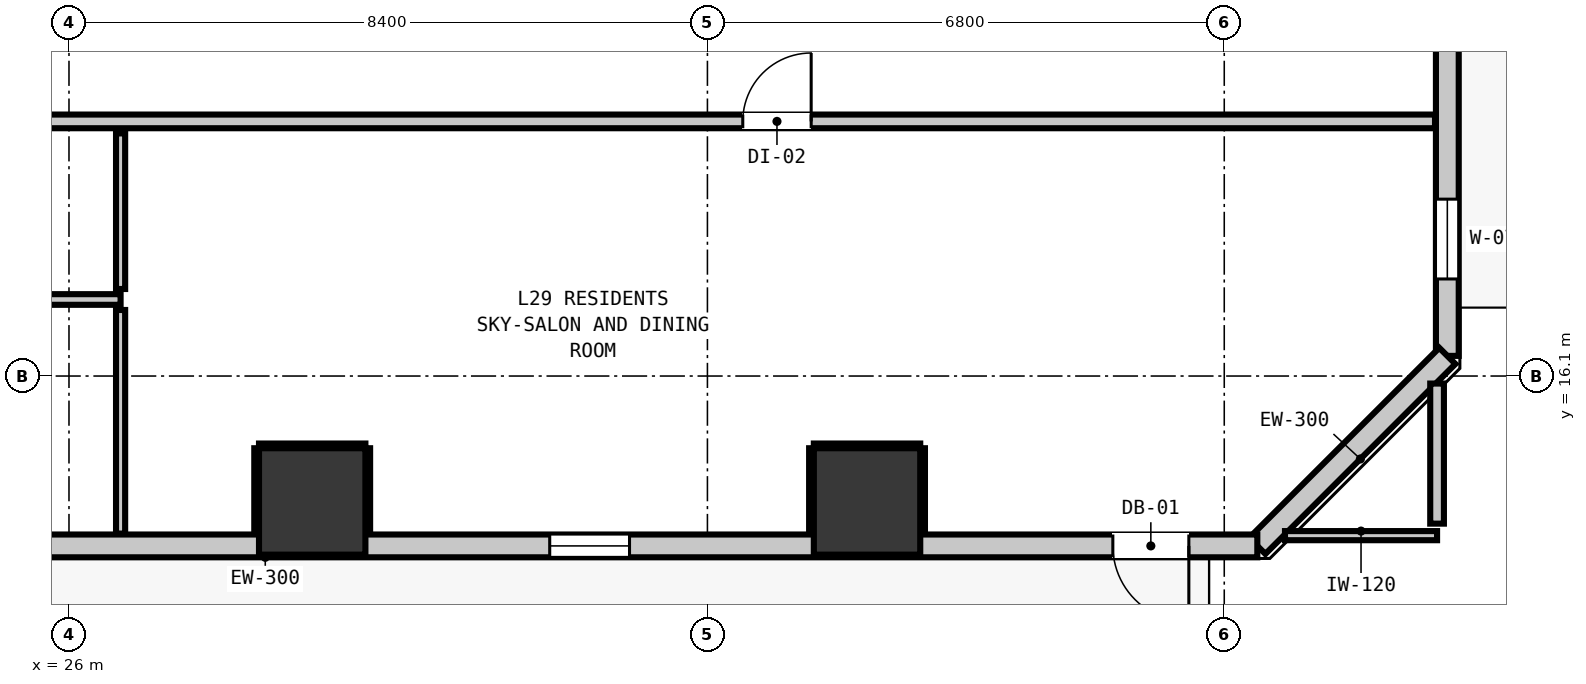
"""IFC4 building model, lengths in metres.
Left out: names, types, materials, properties, quantities, classifications, styles, units other than length and angle.
Written with IfcOpenShell. Run it as: python <this file> out.ifc"""

import sys

from ifc_helpers import new_model, si_unit, direction, frame, frame_2d, origin, origin_2d, place, context, subcontext, project, spatial, rectangle, extrude, element, fill, save


model = new_model("IFC4")
c1 = context("Model", 3, precision=1e-05, world=origin(), true_north=direction((0.0, 1.0)))
c2 = subcontext(c1, "Body", "Model", "MODEL_VIEW")
j1 = project(units=[si_unit("LENGTHUNIT", "METRE"), si_unit("PLANEANGLEUNIT", "RADIAN")], contexts=[c1])
p1 = place(None, origin())
s1 = spatial("IfcSite", under=j1, at=p1, CompositionType="ELEMENT")
p2 = place(p1, origin())
s2 = spatial("IfcBuilding", under=s1, at=p2, CompositionType="ELEMENT")
p3 = place(p2, frame((0.0, 0.0, 102.76)))
s3 = spatial("IfcBuildingStorey", under=s2, at=p3, CompositionType="ELEMENT", Elevation=102.76)
for number, where, z_axis, x_axis in (
    (1, (29.2, 14.45, 0.0), (0.0, 0.0, 1.0), (1.0, 0.0, 0.0)),
    (2, (36.5, 14.45, 0.0), (0.0, 0.0, 1.0), (1.0, 0.0, 0.0)),
):
    element("IfcColumn", number, at=place(p3, frame(where, z_axis=z_axis, x_axis=x_axis)), inside=s3, PredefinedType="COLUMN", context=c2, shape_type="SweptSolid", body=[
        extrude(rectangle(XDim=1.4, YDim=1.4, at=origin_2d()), origin(), (0.0, 0.0, 1.0), 2.9),
    ])
p4 = place(p3, frame((44.135, 51.035, 0.0), z_axis=(0.0, 0.0, 1.0), x_axis=(0.0, -1.0, 0.0)))
e3 = element("IfcWall", 3, at=p4, inside=s3, PredefinedType="STANDARD", context=c2, shape_type="SweptSolid", body=[
    extrude(rectangle(XDim=34.67, YDim=0.3, at=frame_2d((17.335, 0.0))), origin(), (0.0, 0.0, 1.0), 2.9),
])
p5 = place(p4, frame((0.901, 0.0, 0.0)))
e4 = element("IfcOpeningElement", 4, at=p5, cuts=e3, PredefinedType="OPENING", context=c2, shape_type="SweptSolid", body=[
    extrude(rectangle(XDim=1.0, YDim=2.15, at=frame_2d((0.5, 1.075))), frame((0.0, 0.16, 0.0), z_axis=(0.0, -1.0, 0.0), x_axis=(1.0, 0.0, 0.0)), (0.0, 0.0, 1.0), 0.32),
])
p6 = place(p4, frame((32.608, 0.0, 0.85)))
e5 = element("IfcOpeningElement", 5, at=p6, cuts=e3, PredefinedType="OPENING", context=c2, shape_type="SweptSolid", body=[
    extrude(rectangle(XDim=1.05, YDim=1.65, at=frame_2d((0.525, 0.825))), frame((0.0, 0.16, 0.0), z_axis=(0.0, -1.0, 0.0), x_axis=(1.0, 0.0, 0.0)), (0.0, 0.0, 1.0), 0.32),
])
p7 = place(p4, frame((23.248, 0.0, 0.85)))
e6 = element("IfcOpeningElement", 6, at=p7, cuts=e3, PredefinedType="OPENING", context=c2, shape_type="SweptSolid", body=[
    extrude(rectangle(XDim=1.05, YDim=1.65, at=frame_2d((0.525, 0.825))), frame((0.0, 0.16, 0.0), z_axis=(0.0, -1.0, 0.0), x_axis=(1.0, 0.0, 0.0)), (0.0, 0.0, 1.0), 0.32),
])
p8 = place(p3, frame((44.135, 16.365, 0.0), z_axis=(0.0, 0.0, 1.0), x_axis=(-0.707106781187, -0.707106781187, 0.0)))
e7 = element("IfcWall", 7, at=p8, inside=s3, PredefinedType="STANDARD", context=c2, shape_type="SweptSolid", body=[
    extrude(rectangle(XDim=3.536, YDim=0.3, at=frame_2d((1.768, 0.0))), origin(), (0.0, 0.0, 1.0), 2.9),
])
p9 = place(p3, frame((41.635, 13.865, 0.0), z_axis=(0.0, 0.0, 1.0), x_axis=(-1.0, 0.0, 0.0)))
e8 = element("IfcWall", 8, at=p9, inside=s3, PredefinedType="STANDARD", context=c2, shape_type="SweptSolid", body=[
    extrude(rectangle(XDim=37.47, YDim=0.3, at=frame_2d((18.735, 0.0))), origin(), (0.0, 0.0, 1.0), 2.9),
])
p10 = place(p9, frame((0.901, 0.0, 0.0)))
e9 = element("IfcOpeningElement", 9, at=p10, cuts=e8, PredefinedType="OPENING", context=c2, shape_type="SweptSolid", body=[
    extrude(rectangle(XDim=1.0, YDim=2.15, at=frame_2d((0.5, 1.075))), frame((0.0, 0.16, 0.0), z_axis=(0.0, -1.0, 0.0), x_axis=(1.0, 0.0, 0.0)), (0.0, 0.0, 1.0), 0.32),
])
p11 = place(p9, frame((30.949, 0.0, 0.85)))
e10 = element("IfcOpeningElement", 10, at=p11, cuts=e8, PredefinedType="OPENING", context=c2, shape_type="SweptSolid", body=[
    extrude(rectangle(XDim=1.05, YDim=1.65, at=frame_2d((0.525, 0.825))), frame((0.0, 0.16, 0.0), z_axis=(0.0, -1.0, 0.0), x_axis=(1.0, 0.0, 0.0)), (0.0, 0.0, 1.0), 0.32),
])
p12 = place(p9, frame((35.271, 0.0, 0.85)))
e11 = element("IfcOpeningElement", 11, at=p12, cuts=e8, PredefinedType="OPENING", context=c2, shape_type="SweptSolid", body=[
    extrude(rectangle(XDim=1.05, YDim=1.65, at=frame_2d((0.525, 0.825))), frame((0.0, 0.16, 0.0), z_axis=(0.0, -1.0, 0.0), x_axis=(1.0, 0.0, 0.0)), (0.0, 0.0, 1.0), 0.32),
])
p13 = place(p9, frame((23.517, 0.0, 0.85)))
e12 = element("IfcOpeningElement", 12, at=p13, cuts=e8, PredefinedType="OPENING", context=c2, shape_type="SweptSolid", body=[
    extrude(rectangle(XDim=1.05, YDim=1.65, at=frame_2d((0.525, 0.825))), frame((0.0, 0.16, 0.0), z_axis=(0.0, -1.0, 0.0), x_axis=(1.0, 0.0, 0.0)), (0.0, 0.0, 1.0), 0.32),
])
p14 = place(p9, frame((16.795, 0.0, 0.85)))
e13 = element("IfcOpeningElement", 13, at=p14, cuts=e8, PredefinedType="OPENING", context=c2, shape_type="SweptSolid", body=[
    extrude(rectangle(XDim=1.05, YDim=1.65, at=frame_2d((0.525, 0.825))), frame((0.0, 0.16, 0.0), z_axis=(0.0, -1.0, 0.0), x_axis=(1.0, 0.0, 0.0)), (0.0, 0.0, 1.0), 0.32),
])
p15 = place(p9, frame((8.26, 0.0, 0.85)))
e14 = element("IfcOpeningElement", 14, at=p15, cuts=e8, PredefinedType="OPENING", context=c2, shape_type="SweptSolid", body=[
    extrude(rectangle(XDim=1.05, YDim=1.65, at=frame_2d((0.525, 0.825))), frame((0.0, 0.16, 0.0), z_axis=(0.0, -1.0, 0.0), x_axis=(1.0, 0.0, 0.0)), (0.0, 0.0, 1.0), 0.32),
])
p16 = place(p3, frame((1.827, 19.45, 0.0), z_axis=(0.0, 0.0, 1.0), x_axis=(1.0, 0.0, 0.0)))
e15 = element("IfcWall", 15, at=p16, inside=s3, PredefinedType="PARTITIONING", context=c2, shape_type="SweptSolid", body=[
    extrude(rectangle(XDim=42.146, YDim=0.18, at=frame_2d((21.073, 0.0))), origin(), (0.0, 0.0, 1.0), 2.9),
])
p17 = place(p16, frame((8.927, 0.0, 0.0)))
e16 = element("IfcOpeningElement", 16, at=p17, cuts=e15, PredefinedType="OPENING", context=c2, shape_type="SweptSolid", body=[
    extrude(rectangle(XDim=1.0, YDim=2.15, at=frame_2d((0.5, 1.075))), frame((0.0, 0.1, 0.0), z_axis=(0.0, -1.0, 0.0), x_axis=(1.0, 0.0, 0.0)), (0.0, 0.0, 1.0), 0.2),
])
p18 = place(p16, frame((33.038, 0.0, 0.0)))
e17 = element("IfcOpeningElement", 17, at=p18, cuts=e15, PredefinedType="OPENING", context=c2, shape_type="SweptSolid", body=[
    extrude(rectangle(XDim=0.9, YDim=2.1, at=frame_2d((0.45, 1.05))), frame((0.0, 0.1, 0.0), z_axis=(0.0, -1.0, 0.0), x_axis=(1.0, 0.0, 0.0)), (0.0, 0.0, 1.0), 0.2),
])
p19 = place(p3, frame((14.986, 17.107, 0.0), z_axis=(0.0, 0.0, 1.0), x_axis=(1.0, 0.0, 0.0)))
e18 = element("IfcWall", 18, at=p19, inside=s3, PredefinedType="PARTITIONING", context=c2, shape_type="SweptSolid", body=[
    extrude(rectangle(XDim=11.693, YDim=0.14, at=frame_2d((5.846, 0.0))), origin(), (0.0, 0.0, 1.0), 2.9),
])
p20 = place(p3, frame((41.999, 14.0, 0.0), z_axis=(0.0, 0.0, 1.0), x_axis=(1.0, 0.0, 0.0)))
e19 = element("IfcWall", 19, at=p20, inside=s3, PredefinedType="PARTITIONING", context=c2, shape_type="SweptSolid", body=[
    extrude(rectangle(XDim=2.001, YDim=0.12, at=frame_2d((1.0, 0.0))), origin(), (0.0, 0.0, 1.0), 2.9),
])
p21 = place(p3, frame((44.0, 14.158, 0.0), z_axis=(0.0, 0.0, 1.0), x_axis=(0.0, 1.0, 0.0)))
e20 = element("IfcWall", 20, at=p21, inside=s3, PredefinedType="PARTITIONING", context=c2, shape_type="SweptSolid", body=[
    extrude(rectangle(XDim=1.843, YDim=0.18, at=frame_2d((0.921, 0.0))), origin(), (0.0, 0.0, 1.0), 2.9),
])
p22 = place(p3, frame((26.679, 14.027, 0.0), z_axis=(0.0, 0.0, 1.0), x_axis=(0.0, 1.0, 0.0)))
e21 = element("IfcWall", 21, at=p22, inside=s3, PredefinedType="PARTITIONING", context=c2, shape_type="SweptSolid", body=[
    extrude(rectangle(XDim=2.942, YDim=0.12, at=frame_2d((1.471, 0.0))), origin(), (0.0, 0.0, 1.0), 2.9),
])
p23 = place(p3, frame((26.679, 17.245, 0.0), z_axis=(0.0, 0.0, 1.0), x_axis=(0.0, 1.0, 0.0)))
e22 = element("IfcWall", 22, at=p23, inside=s3, PredefinedType="PARTITIONING", context=c2, shape_type="SweptSolid", body=[
    extrude(rectangle(XDim=2.047, YDim=0.12, at=frame_2d((1.023, 0.0))), origin(), (0.0, 0.0, 1.0), 2.9),
])
p24 = place(p3, frame((28.5, 15.182, 0.0), z_axis=(0.0, 0.0, 1.0), x_axis=(1.0, 0.0, 0.0)))
e23 = element("IfcWall", 23, at=p24, inside=s3, PredefinedType="PARTITIONING", context=c2, shape_type="SweptSolid", body=[
    extrude(rectangle(XDim=1.4, YDim=0.06, at=frame_2d((0.7, 0.0))), origin(), (0.0, 0.0, 1.0), 1.45),
])
for number, where, z_axis, x_axis in (
    (24, (28.468, 14.03, 0.0), (0.0, 0.0, 1.0), (0.0, 1.0, 0.0)),
    (25, (29.932, 14.03, 0.0), (0.0, 0.0, 1.0), (0.0, 1.0, 0.0)),
):
    element("IfcWall", number, at=place(p3, frame(where, z_axis=z_axis, x_axis=x_axis)), inside=s3, PredefinedType="PARTITIONING", context=c2, shape_type="SweptSolid", body=[
        extrude(rectangle(XDim=1.12, YDim=0.06, at=frame_2d((0.56, 0.0))), origin(), (0.0, 0.0, 1.0), 1.45),
    ])
p25 = place(p3, frame((35.8, 15.182, 0.0), z_axis=(0.0, 0.0, 1.0), x_axis=(1.0, 0.0, 0.0)))
e26 = element("IfcWall", 26, at=p25, inside=s3, PredefinedType="PARTITIONING", context=c2, shape_type="SweptSolid", body=[
    extrude(rectangle(XDim=1.4, YDim=0.06, at=frame_2d((0.7, 0.0))), origin(), (0.0, 0.0, 1.0), 1.45),
])
for number, where, z_axis, x_axis in (
    (27, (35.768, 14.03, 0.0), (0.0, 0.0, 1.0), (0.0, 1.0, 0.0)),
    (28, (37.232, 14.03, 0.0), (0.0, 0.0, 1.0), (0.0, 1.0, 0.0)),
):
    element("IfcWall", number, at=place(p3, frame(where, z_axis=z_axis, x_axis=x_axis)), inside=s3, PredefinedType="PARTITIONING", context=c2, shape_type="SweptSolid", body=[
        extrude(rectangle(XDim=1.12, YDim=0.06, at=frame_2d((0.56, 0.0))), origin(), (0.0, 0.0, 1.0), 1.45),
    ])
p26 = place(p10, origin())
e29 = element("IfcDoor", 29, at=p26, inside=s3, OperationType="SINGLE_SWING_LEFT", PredefinedType="DOOR", context=c2, shape_type="SweptSolid", body=[
    extrude(rectangle(XDim=1.0, YDim=2.15, at=frame_2d((0.5, 1.075))), frame((0.0, 0.025, 0.0), z_axis=(0.0, -1.0, 0.0), x_axis=(1.0, 0.0, 0.0)), (0.0, 0.0, 1.0), 0.05),
])
fill(e9, e29)
p27 = place(p6, origin())
e30 = element("IfcWindow", 30, at=p27, inside=s3, PartitioningType="SINGLE_PANEL", PredefinedType="WINDOW", context=c2, shape_type="SweptSolid", body=[
    extrude(rectangle(XDim=1.05, YDim=1.65, at=frame_2d((0.525, 0.825))), frame((0.0, 0.03, 0.0), z_axis=(0.0, -1.0, 0.0), x_axis=(1.0, 0.0, 0.0)), (0.0, 0.0, 1.0), 0.06),
])
fill(e5, e30)
p28 = place(p15, origin())
e31 = element("IfcWindow", 31, at=p28, inside=s3, PartitioningType="SINGLE_PANEL", PredefinedType="WINDOW", context=c2, shape_type="SweptSolid", body=[
    extrude(rectangle(XDim=1.05, YDim=1.65, at=frame_2d((0.525, 0.825))), frame((0.0, 0.03, 0.0), z_axis=(0.0, -1.0, 0.0), x_axis=(1.0, 0.0, 0.0)), (0.0, 0.0, 1.0), 0.06),
])
fill(e14, e31)
p29 = place(p18, origin())
e32 = element("IfcDoor", 32, at=p29, inside=s3, OperationType="SINGLE_SWING_RIGHT", PredefinedType="DOOR", context=c2, shape_type="SweptSolid", body=[
    extrude(rectangle(XDim=0.9, YDim=2.1, at=frame_2d((0.45, 1.05))), frame((0.0, 0.025, 0.0), z_axis=(0.0, -1.0, 0.0), x_axis=(1.0, 0.0, 0.0)), (0.0, 0.0, 1.0), 0.05),
])
fill(e17, e32)
save(model, sys.argv[1])
